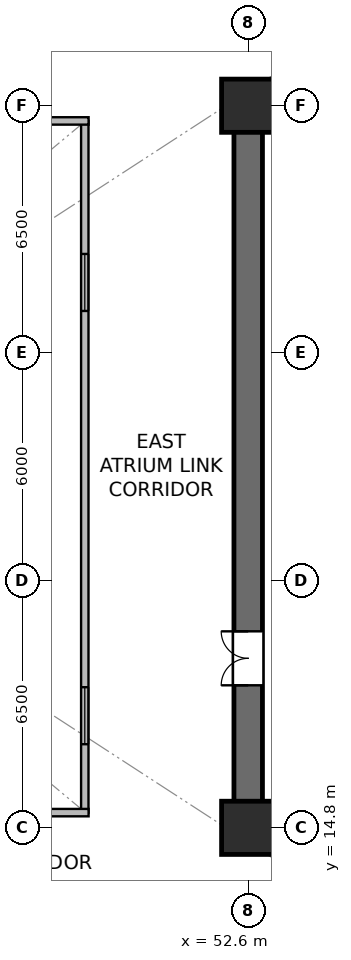
"""IFC4 building model, lengths in metres.
Left out: names, types, materials, properties, quantities, classifications, styles, units other than length and angle.
Written with IfcOpenShell. Run it as: python <this file> out.ifc"""

import sys

from ifc_helpers import new_model, si_unit, direction, frame, frame_2d, origin, origin_2d, place, context, subcontext, project, spatial, rectangle, extrude, source, transform, mapped, element, fill, save


model = new_model("IFC4")
c1 = context("Model", 3, precision=1e-05, world=origin(), true_north=direction((0.0, 1.0)))
c2 = subcontext(c1, "Body", "Model", "MODEL_VIEW")
j1 = project(units=[si_unit("LENGTHUNIT", "METRE"), si_unit("PLANEANGLEUNIT", "RADIAN")], contexts=[c1])
p1 = place(None, origin())
s1 = spatial("IfcSite", under=j1, at=p1, CompositionType="ELEMENT")
p2 = place(p1, origin())
s2 = spatial("IfcBuilding", under=s1, at=p2, CompositionType="ELEMENT")
p3 = place(p2, frame((0.0, 0.0, 25.2)))
s3 = spatial("IfcBuildingStorey", under=s2, at=p3, CompositionType="ELEMENT", Elevation=25.2)
p4 = place(p3, frame((52.225, 14.8, 0.0), z_axis=(0.0, 0.0, 1.0), x_axis=(1.0, 0.0, 0.0)))
e1 = element("IfcWall", 1, at=p4, inside=s3, PredefinedType="SHEAR", context=c2, shape_type="SweptSolid", body=[
    extrude(rectangle(XDim=15.55, YDim=0.75, at=frame_2d((7.775, 0.0))), origin(), (0.0, 0.0, 1.0), 3.78),
])
p5 = place(p3, frame((52.225, 33.8, 0.0), z_axis=(0.0, 0.0, 1.0), x_axis=(1.0, 0.0, 0.0)))
e2 = element("IfcWall", 2, at=p5, inside=s3, PredefinedType="SHEAR", context=c2, shape_type="SweptSolid", body=[
    extrude(rectangle(XDim=15.55, YDim=0.75, at=frame_2d((7.775, 0.0))), origin(), (0.0, 0.0, 1.0), 3.78),
])
p6 = place(p5, frame((7.725, 0.0, 0.0)))
e3 = element("IfcOpeningElement", 3, at=p6, cuts=e2, PredefinedType="OPENING", context=c2, shape_type="SweptSolid", body=[
    extrude(rectangle(XDim=0.95, YDim=2.15, at=frame_2d((0.475, 1.075))), frame((0.0, 0.385, 0.0), z_axis=(0.0, -1.0, 0.0), x_axis=(1.0, 0.0, 0.0)), (0.0, 0.0, 1.0), 0.77),
])
p7 = place(p5, frame((2.66, 0.0, 0.0)))
e4 = element("IfcOpeningElement", 4, at=p7, cuts=e2, PredefinedType="OPENING", context=c2, shape_type="SweptSolid", body=[
    extrude(rectangle(XDim=0.95, YDim=2.15, at=frame_2d((0.475, 1.075))), frame((0.0, 0.385, 0.0), z_axis=(0.0, -1.0, 0.0), x_axis=(1.0, 0.0, 0.0)), (0.0, 0.0, 1.0), 0.77),
])
p8 = place(p3, frame((52.6, 15.175, 0.0), z_axis=(0.0, 0.0, 1.0), x_axis=(0.0, 1.0, 0.0)))
e5 = element("IfcWall", 5, at=p8, inside=s3, PredefinedType="SHEAR", context=c2, shape_type="SweptSolid", body=[
    extrude(rectangle(XDim=18.25, YDim=0.75, at=frame_2d((9.125, 0.0))), origin(), (0.0, 0.0, 1.0), 3.78),
])
p9 = place(p8, frame((3.375, 0.0, 0.0)))
e6 = element("IfcOpeningElement", 6, at=p9, cuts=e5, PredefinedType="OPENING", context=c2, shape_type="SweptSolid", body=[
    extrude(rectangle(XDim=1.42, YDim=2.2, at=frame_2d((0.71, 1.1))), frame((0.0, 0.385, 0.0), z_axis=(0.0, -1.0, 0.0), x_axis=(1.0, 0.0, 0.0)), (0.0, 0.0, 1.0), 0.77),
])
m1 = source(origin(), c2, "Body", "SweptSolid", [
    extrude(rectangle(XDim=1.4, YDim=1.4, at=origin_2d()), origin(), (0.0, 0.0, 1.0), 4.1),
])
for number, where, z_axis, x_axis in (
    (7, (52.6, 14.8, 0.0), (0.0, 0.0, 1.0), (1.0, 0.0, 0.0)),
    (8, (52.6, 33.8, 0.0), (0.0, 0.0, 1.0), (1.0, 0.0, 0.0)),
):
    element("IfcColumn", number, at=place(p3, frame(where, z_axis=z_axis, x_axis=x_axis)), inside=s3, PredefinedType="COLUMN", context=c2, shape_type="MappedRepresentation", body=[
        mapped(m1, transform((0.0, 0.0, 0.0), scale=1.0)),
    ])
p10 = place(p3, frame((48.3, 15.2, 0.0), z_axis=(0.0, 0.0, 1.0), x_axis=(0.0, 1.0, 0.0)))
e9 = element("IfcWall", 9, at=p10, inside=s3, PredefinedType="SOLIDWALL", context=c2, shape_type="SweptSolid", body=[
    extrude(rectangle(XDim=18.2, YDim=0.195, at=frame_2d((9.1, 0.0))), origin(), (0.0, 0.0, 1.0), 3.78),
])
p11 = place(p10, frame((1.8, 0.0, 0.9)))
e10 = element("IfcOpeningElement", 10, at=p11, cuts=e9, PredefinedType="OPENING", context=c2, shape_type="SweptSolid", body=[
    extrude(rectangle(XDim=1.5, YDim=1.4, at=frame_2d((0.75, 0.7))), frame((0.0, 0.107, 0.0), z_axis=(0.0, -1.0, 0.0), x_axis=(1.0, 0.0, 0.0)), (0.0, 0.0, 1.0), 0.215),
])
p12 = place(p10, frame((13.2, 0.0, 0.9)))
e11 = element("IfcOpeningElement", 11, at=p12, cuts=e9, PredefinedType="OPENING", context=c2, shape_type="SweptSolid", body=[
    extrude(rectangle(XDim=1.5, YDim=1.4, at=frame_2d((0.75, 0.7))), frame((0.0, 0.107, 0.0), z_axis=(0.0, -1.0, 0.0), x_axis=(1.0, 0.0, 0.0)), (0.0, 0.0, 1.0), 0.215),
])
for number, where, z_axis, x_axis in (
    (12, (26.4, 15.2, 0.0), (0.0, 0.0, 1.0), (1.0, 0.0, 0.0)),
    (13, (26.4, 33.4, 0.0), (0.0, 0.0, 1.0), (1.0, 0.0, 0.0)),
):
    element("IfcWall", number, at=place(p3, frame(where, z_axis=z_axis, x_axis=x_axis)), inside=s3, PredefinedType="SOLIDWALL", context=c2, shape_type="SweptSolid", body=[
        extrude(rectangle(XDim=22.0, YDim=0.195, at=frame_2d((11.0, 0.0))), origin(), (0.0, 0.0, 1.0), 3.78),
    ])
m2 = source(origin(), c2, "Body", "SweptSolid", [
    extrude(rectangle(XDim=1.5, YDim=1.4, at=frame_2d((0.75, 0.7))), frame((0.0, 0.03, 0.0), z_axis=(0.0, -1.0, 0.0), x_axis=(1.0, 0.0, 0.0)), (0.0, 0.0, 1.0), 0.06),
])
p13 = place(p11, origin())
e14 = element("IfcWindow", 14, at=p13, inside=s3, PartitioningType="SINGLE_PANEL", PredefinedType="WINDOW", context=c2, shape_type="MappedRepresentation", body=[
    mapped(m2, transform((0.0, 0.0, 0.0), scale=1.0)),
])
fill(e10, e14)
p14 = place(p12, origin())
e15 = element("IfcWindow", 15, at=p14, inside=s3, PartitioningType="SINGLE_PANEL", PredefinedType="WINDOW", context=c2, shape_type="MappedRepresentation", body=[
    mapped(m2, transform((0.0, 0.0, 0.0), scale=1.0)),
])
fill(e11, e15)
m3 = source(origin(), c2, "Body", "SweptSolid", [
    extrude(rectangle(XDim=1.42, YDim=2.2, at=frame_2d((0.71, 1.1))), frame((0.0, 0.025, 0.0), z_axis=(0.0, -1.0, 0.0), x_axis=(1.0, 0.0, 0.0)), (0.0, 0.0, 1.0), 0.05),
])
p15 = place(p9, origin())
e16 = element("IfcDoor", 16, at=p15, inside=s3, OperationType="DOUBLE_DOOR_SINGLE_SWING", PredefinedType="DOOR", context=c2, shape_type="MappedRepresentation", body=[
    mapped(m3, transform((0.0, 0.0, 0.0), scale=1.0)),
])
fill(e6, e16)
save(model, sys.argv[1])
